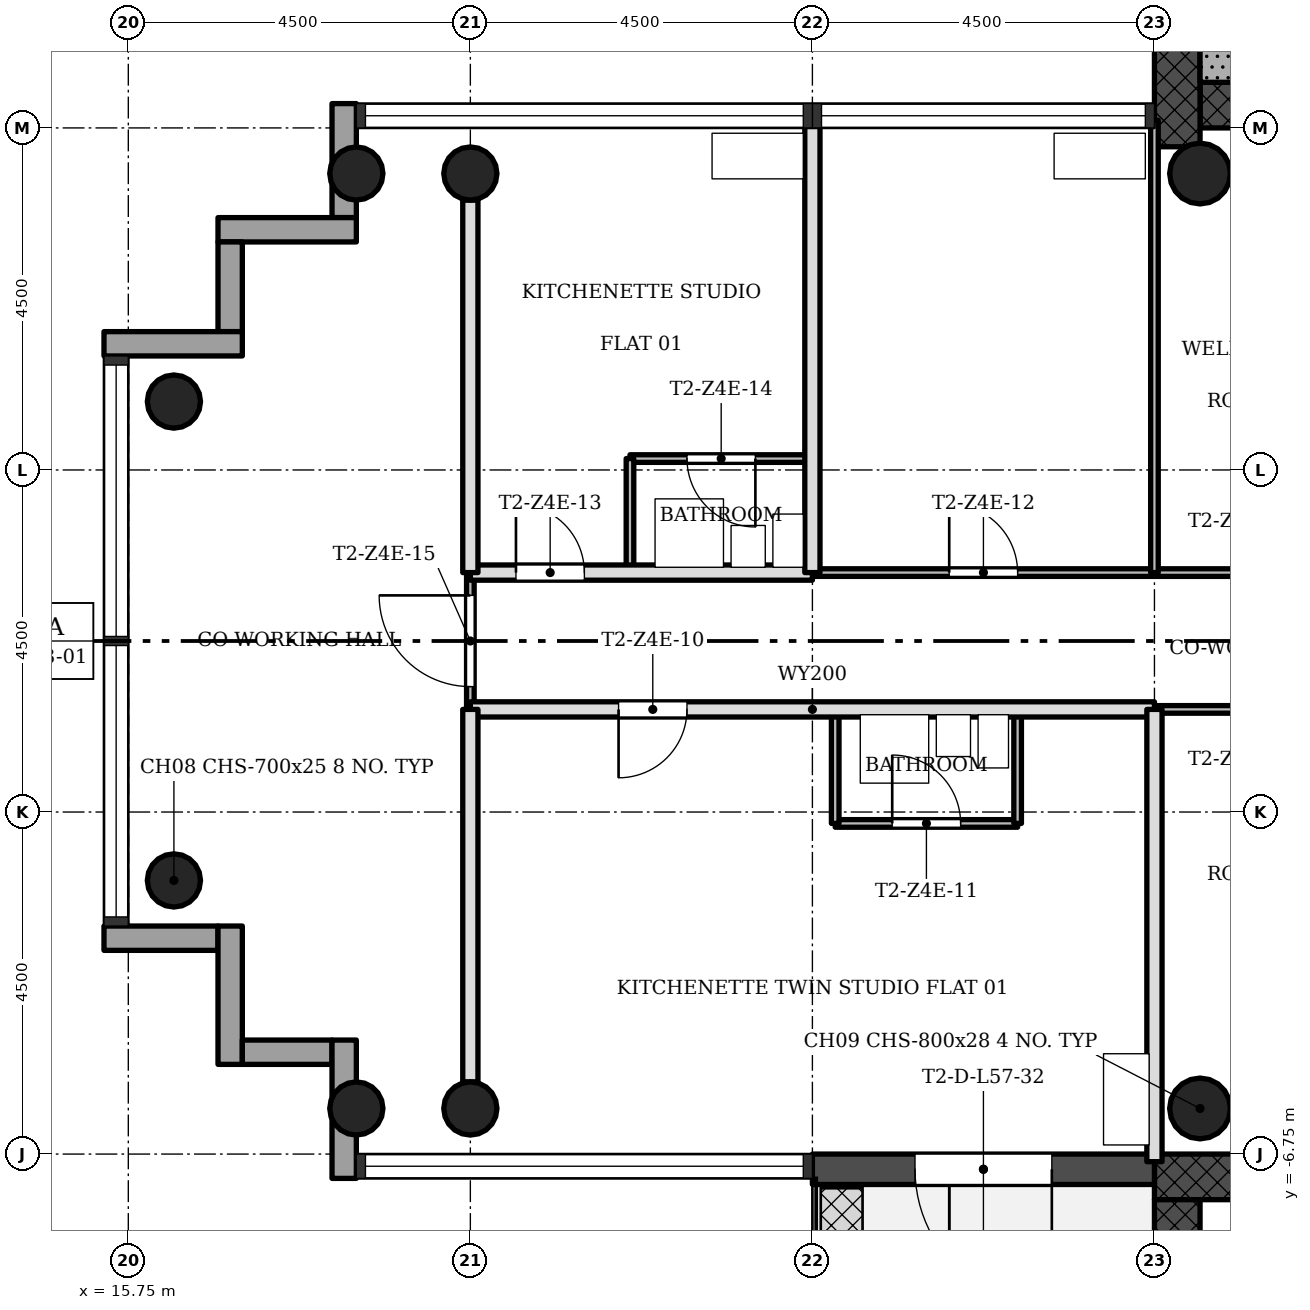
"""IFC4 building model, lengths in metres.
Left out: names, types, materials, properties, quantities, classifications, styles, units other than length and angle.
Written with IfcOpenShell. Run it as: python <this file> out.ifc"""

import sys

from ifc_helpers import new_model, si_unit, direction, frame, frame_2d, origin, origin_2d, place, context, subcontext, project, spatial, rectangle, hollow_circle, extrude, element, fill, save


model = new_model("IFC4")
c1 = context("Model", 3, precision=1e-05, world=origin(), true_north=direction((0.0, 1.0)))
c2 = subcontext(c1, "Body", "Model", "MODEL_VIEW")
j1 = project(units=[si_unit("LENGTHUNIT", "METRE"), si_unit("PLANEANGLEUNIT", "RADIAN")], contexts=[c1])
p1 = place(None, origin())
s1 = spatial("IfcSite", under=j1, at=p1, CompositionType="ELEMENT")
p2 = place(p1, origin())
s2 = spatial("IfcBuilding", under=s1, at=p2, CompositionType="ELEMENT")
p3 = place(p2, frame((0.0, 0.0, 206.2)))
s3 = spatial("IfcBuildingStorey", under=s2, at=p3, CompositionType="ELEMENT", Elevation=206.2)
p4 = place(p3, frame((29.85, 7.05, 0.0), z_axis=(0.0, 0.0, 1.0), x_axis=(1.0, 0.0, 0.0)))
e1 = element("IfcWall", 1, at=p4, inside=s3, PredefinedType="SHEAR", context=c2, shape_type="SweptSolid", body=[
    extrude(rectangle(XDim=12.9, YDim=0.6, at=frame_2d((6.45, 0.0))), origin(), (0.0, 0.0, 1.0), 3.4),
])
p5 = place(p4, frame((5.25, 0.0, 0.0)))
e2 = element("IfcOpeningElement", 2, at=p5, cuts=e1, PredefinedType="OPENING", context=c2, shape_type="SweptSolid", body=[
    extrude(rectangle(XDim=1.8, YDim=2.1, at=frame_2d((0.9, 1.05))), frame((0.0, 0.31, 0.0), z_axis=(0.0, -1.0, 0.0), x_axis=(1.0, 0.0, 0.0)), (0.0, 0.0, 1.0), 0.62),
])
p6 = place(p3, frame((29.55, 15.15, 0.0), z_axis=(0.0, 0.0, 1.0), x_axis=(0.0, -1.0, 0.0)))
e3 = element("IfcWall", 3, at=p6, inside=s3, PredefinedType="SHEAR", context=c2, shape_type="SweptSolid", body=[
    extrude(rectangle(XDim=8.648, YDim=0.6, at=frame_2d((4.324, 0.0))), origin(), (0.0, 0.0, 1.0), 3.4),
])
p7 = place(p3, frame((42.15, -7.05, 0.0), z_axis=(0.0, 0.0, 1.0), x_axis=(-1.0, 0.0, 0.0)))
e4 = element("IfcWall", 4, at=p7, inside=s3, PredefinedType="SHEAR", context=c2, shape_type="SweptSolid", body=[
    extrude(rectangle(XDim=12.9, YDim=0.6, at=frame_2d((6.45, 0.0))), origin(), (0.0, 0.0, 1.0), 3.4),
])
p8 = place(p7, frame((5.25, 0.0, 0.0)))
e5 = element("IfcOpeningElement", 5, at=p8, cuts=e4, PredefinedType="OPENING", context=c2, shape_type="SweptSolid", body=[
    extrude(rectangle(XDim=1.8, YDim=2.1, at=frame_2d((0.9, 1.05))), frame((0.0, 0.31, 0.0), z_axis=(0.0, -1.0, 0.0), x_axis=(1.0, 0.0, 0.0)), (0.0, 0.0, 1.0), 0.62),
])
p9 = place(p3, frame((29.55, -7.35, 0.0), z_axis=(0.0, 0.0, 1.0), x_axis=(0.0, -1.0, 0.0)))
e6 = element("IfcWall", 6, at=p9, inside=s3, PredefinedType="SHEAR", context=c2, shape_type="SweptSolid", body=[
    extrude(rectangle(XDim=8.4, YDim=0.6, at=frame_2d((4.2, 0.0))), origin(), (0.0, 0.0, 1.0), 3.4),
])
for number, where, z_axis, x_axis in (
    (7, (20.25, 6.15, 0.0), (0.0, 0.0, 1.0), (1.0, 0.0, 0.0)),
    (8, (20.25, -6.15, 0.0), (0.0, 0.0, 1.0), (1.0, 0.0, 0.0)),
    (9, (18.75, 6.15, 0.0), (0.0, 0.0, 1.0), (1.0, 0.0, 0.0)),
    (10, (18.75, -6.15, 0.0), (0.0, 0.0, 1.0), (1.0, 0.0, 0.0)),
    (11, (16.35, 3.15, 0.0), (0.0, 0.0, 1.0), (1.0, 0.0, 0.0)),
    (12, (16.35, -3.15, 0.0), (0.0, 0.0, 1.0), (1.0, 0.0, 0.0)),
):
    element("IfcColumn", number, at=place(p3, frame(where, z_axis=z_axis, x_axis=x_axis)), inside=s3, PredefinedType="COLUMN", context=c2, shape_type="SweptSolid", body=[
        extrude(hollow_circle(Radius=0.35, WallThickness=0.025, at=origin_2d()), origin(), (0.0, 0.0, 1.0), 3.4),
    ])
for number, where, z_axis, x_axis in (
    (13, (29.85, 6.15, 0.0), (0.0, 0.0, 1.0), (1.0, 0.0, 0.0)),
    (14, (29.85, -6.15, 0.0), (0.0, 0.0, 1.0), (1.0, 0.0, 0.0)),
):
    element("IfcColumn", number, at=place(p3, frame(where, z_axis=z_axis, x_axis=x_axis)), inside=s3, PredefinedType="COLUMN", context=c2, shape_type="SweptSolid", body=[
        extrude(hollow_circle(Radius=0.4, WallThickness=0.028, at=origin_2d()), origin(), (0.0, 0.0, 1.0), 3.4),
    ])
p10 = place(p3, frame((18.59, 7.07, -0.3), z_axis=(0.0, 0.0, 1.0), x_axis=(0.0, -1.0, 0.0)))
e15 = element("IfcWall", 15, at=p10, inside=s3, PredefinedType="STANDARD", context=c2, shape_type="SweptSolid", body=[
    extrude(rectangle(XDim=1.5, YDim=0.32, at=frame_2d((0.75, 0.0))), origin(), (0.0, 0.0, 1.0), 3.4),
])
p11 = place(p3, frame((18.75, 5.41, -0.3), z_axis=(0.0, 0.0, 1.0), x_axis=(-1.0, 0.0, 0.0)))
e16 = element("IfcWall", 16, at=p11, inside=s3, PredefinedType="STANDARD", context=c2, shape_type="SweptSolid", body=[
    extrude(rectangle(XDim=1.82, YDim=0.32, at=frame_2d((0.91, 0.0))), origin(), (0.0, 0.0, 1.0), 3.4),
])
p12 = place(p3, frame((17.09, 5.25, -0.3), z_axis=(0.0, 0.0, 1.0), x_axis=(0.0, -1.0, 0.0)))
e17 = element("IfcWall", 17, at=p12, inside=s3, PredefinedType="STANDARD", context=c2, shape_type="SweptSolid", body=[
    extrude(rectangle(XDim=1.18, YDim=0.32, at=frame_2d((0.59, 0.0))), origin(), (0.0, 0.0, 1.0), 3.4),
])
p13 = place(p3, frame((17.25, 3.91, -0.3), z_axis=(0.0, 0.0, 1.0), x_axis=(-1.0, 0.0, 0.0)))
e18 = element("IfcWall", 18, at=p13, inside=s3, PredefinedType="STANDARD", context=c2, shape_type="SweptSolid", body=[
    extrude(rectangle(XDim=1.82, YDim=0.32, at=frame_2d((0.91, 0.0))), origin(), (0.0, 0.0, 1.0), 3.4),
])
p14 = place(p3, frame((15.43, -3.91, -0.3), z_axis=(0.0, 0.0, 1.0), x_axis=(1.0, 0.0, 0.0)))
e19 = element("IfcWall", 19, at=p14, inside=s3, PredefinedType="STANDARD", context=c2, shape_type="SweptSolid", body=[
    extrude(rectangle(XDim=1.5, YDim=0.32, at=frame_2d((0.75, 0.0))), origin(), (0.0, 0.0, 1.0), 3.4),
])
p15 = place(p3, frame((17.09, -3.75, -0.3), z_axis=(0.0, 0.0, 1.0), x_axis=(0.0, -1.0, 0.0)))
e20 = element("IfcWall", 20, at=p15, inside=s3, PredefinedType="STANDARD", context=c2, shape_type="SweptSolid", body=[
    extrude(rectangle(XDim=1.82, YDim=0.32, at=frame_2d((0.91, 0.0))), origin(), (0.0, 0.0, 1.0), 3.4),
])
p16 = place(p3, frame((17.25, -5.41, -0.3), z_axis=(0.0, 0.0, 1.0), x_axis=(1.0, 0.0, 0.0)))
e21 = element("IfcWall", 21, at=p16, inside=s3, PredefinedType="STANDARD", context=c2, shape_type="SweptSolid", body=[
    extrude(rectangle(XDim=1.18, YDim=0.32, at=frame_2d((0.59, 0.0))), origin(), (0.0, 0.0, 1.0), 3.4),
])
p17 = place(p3, frame((18.59, -5.25, -0.3), z_axis=(0.0, 0.0, 1.0), x_axis=(0.0, -1.0, 0.0)))
e22 = element("IfcWall", 22, at=p17, inside=s3, PredefinedType="STANDARD", context=c2, shape_type="SweptSolid", body=[
    extrude(rectangle(XDim=1.82, YDim=0.32, at=frame_2d((0.91, 0.0))), origin(), (0.0, 0.0, 1.0), 3.4),
])
p18 = place(p3, frame((24.75, -6.95, -0.02), z_axis=(0.0, 0.0, 1.0), x_axis=(1.0, 0.0, 0.0)))
e23 = element("IfcWall", 23, at=p18, inside=s3, PredefinedType="STANDARD", context=c2, shape_type="SweptSolid", body=[
    extrude(rectangle(XDim=4.5, YDim=0.4, at=frame_2d((2.25, 0.0))), origin(), (0.0, 0.0, 1.0), 3.12),
])
p19 = place(p18, frame((1.35, 0.0, 0.02)))
e24 = element("IfcOpeningElement", 24, at=p19, cuts=e23, PredefinedType="OPENING", context=c2, shape_type="SweptSolid", body=[
    extrude(rectangle(XDim=1.8, YDim=2.1, at=frame_2d((0.9, 1.05))), frame((0.0, 0.21, 0.0), z_axis=(0.0, -1.0, 0.0), x_axis=(1.0, 0.0, 0.0)), (0.0, 0.0, 1.0), 0.42),
])
p20 = place(p3, frame((27.45, -2.4, 0.0), z_axis=(0.0, 0.0, 1.0), x_axis=(-1.0, 0.0, 0.0)))
e25 = element("IfcWall", 25, at=p20, inside=s3, PredefinedType="PARTITIONING", context=c2, shape_type="SweptSolid", body=[
    extrude(rectangle(XDim=2.4, YDim=0.1, at=frame_2d((1.2, 0.0))), origin(), (0.0, 0.0, 1.0), 3.0),
])
p21 = place(p20, frame((0.75, 0.0, 0.0)))
e26 = element("IfcOpeningElement", 26, at=p21, cuts=e25, PredefinedType="OPENING", context=c2, shape_type="SweptSolid", body=[
    extrude(rectangle(XDim=0.9, YDim=2.1, at=frame_2d((0.45, 1.05))), frame((0.0, 0.06, 0.0), z_axis=(0.0, -1.0, 0.0), x_axis=(1.0, 0.0, 0.0)), (0.0, 0.0, 1.0), 0.12),
])
p22 = place(p3, frame((31.5, -0.9, 0.0), z_axis=(0.0, 0.0, 1.0), x_axis=(-1.0, 0.0, 0.0)))
e27 = element("IfcWall", 27, at=p22, inside=s3, PredefinedType="PARTITIONING", context=c2, shape_type="SweptSolid", body=[
    extrude(rectangle(XDim=2.25, YDim=0.1, at=frame_2d((1.125, 0.0))), origin(), (0.0, 0.0, 1.0), 3.0),
])
p23 = place(p3, frame((29.25, -0.9, 0.0), z_axis=(0.0, 0.0, 1.0), x_axis=(-1.0, 0.0, 0.0)))
e28 = element("IfcWall", 28, at=p23, inside=s3, PredefinedType="SOLIDWALL", context=c2, shape_type="SweptSolid", body=[
    extrude(rectangle(XDim=9.0, YDim=0.2, at=frame_2d((4.5, 0.0))), origin(), (0.0, 0.0, 1.0), 3.0),
])
p24 = place(p23, frame((6.15, 0.0, 0.0)))
e29 = element("IfcOpeningElement", 29, at=p24, cuts=e28, PredefinedType="OPENING", context=c2, shape_type="SweptSolid", body=[
    extrude(rectangle(XDim=0.9, YDim=2.1, at=frame_2d((0.45, 1.05))), frame((0.0, 0.11, 0.0), z_axis=(0.0, -1.0, 0.0), x_axis=(1.0, 0.0, 0.0)), (0.0, 0.0, 1.0), 0.22),
])
p25 = place(p3, frame((31.5, 0.9, 0.0), z_axis=(0.0, 0.0, 1.0), x_axis=(-1.0, 0.0, 0.0)))
e30 = element("IfcWall", 30, at=p25, inside=s3, PredefinedType="PARTITIONING", context=c2, shape_type="SweptSolid", body=[
    extrude(rectangle(XDim=6.75, YDim=0.1, at=frame_2d((3.375, 0.0))), origin(), (0.0, 0.0, 1.0), 3.0),
])
p26 = place(p25, frame((4.05, 0.0, 0.0)))
e31 = element("IfcOpeningElement", 31, at=p26, cuts=e30, PredefinedType="OPENING", context=c2, shape_type="SweptSolid", body=[
    extrude(rectangle(XDim=0.9, YDim=2.1, at=frame_2d((0.45, 1.05))), frame((0.0, 0.06, 0.0), z_axis=(0.0, -1.0, 0.0), x_axis=(1.0, 0.0, 0.0)), (0.0, 0.0, 1.0), 0.12),
])
p27 = place(p3, frame((24.75, 0.9, 0.0), z_axis=(0.0, 0.0, 1.0), x_axis=(-1.0, 0.0, 0.0)))
e32 = element("IfcWall", 32, at=p27, inside=s3, PredefinedType="SOLIDWALL", context=c2, shape_type="SweptSolid", body=[
    extrude(rectangle(XDim=4.5, YDim=0.2, at=frame_2d((2.25, 0.0))), origin(), (0.0, 0.0, 1.0), 3.0),
])
p28 = place(p27, frame((3.0, 0.0, 0.0)))
e33 = element("IfcOpeningElement", 33, at=p28, cuts=e32, PredefinedType="OPENING", context=c2, shape_type="SweptSolid", body=[
    extrude(rectangle(XDim=0.9, YDim=2.1, at=frame_2d((0.45, 1.05))), frame((0.0, 0.11, 0.0), z_axis=(0.0, -1.0, 0.0), x_axis=(1.0, 0.0, 0.0)), (0.0, 0.0, 1.0), 0.22),
])
p29 = place(p3, frame((24.75, 2.4, 0.0), z_axis=(0.0, 0.0, 1.0), x_axis=(-1.0, 0.0, 0.0)))
e34 = element("IfcWall", 34, at=p29, inside=s3, PredefinedType="PARTITIONING", context=c2, shape_type="SweptSolid", body=[
    extrude(rectangle(XDim=2.4, YDim=0.1, at=frame_2d((1.2, 0.0))), origin(), (0.0, 0.0, 1.0), 3.0),
])
p30 = place(p29, frame((0.75, 0.0, 0.0)))
e35 = element("IfcOpeningElement", 35, at=p30, cuts=e34, PredefinedType="OPENING", context=c2, shape_type="SweptSolid", body=[
    extrude(rectangle(XDim=0.9, YDim=2.1, at=frame_2d((0.45, 1.05))), frame((0.0, 0.06, 0.0), z_axis=(0.0, -1.0, 0.0), x_axis=(1.0, 0.0, 0.0)), (0.0, 0.0, 1.0), 0.12),
])
p31 = place(p3, frame((29.25, 0.9, 0.0), z_axis=(0.0, 0.0, 1.0), x_axis=(0.0, 1.0, 0.0)))
e36 = element("IfcWall", 36, at=p31, inside=s3, PredefinedType="PARTITIONING", context=c2, shape_type="SweptSolid", body=[
    extrude(rectangle(XDim=5.95, YDim=0.1, at=frame_2d((2.975, 0.0))), origin(), (0.0, 0.0, 1.0), 3.0),
])
p32 = place(p3, frame((29.25, -6.85, 0.0), z_axis=(0.0, 0.0, 1.0), x_axis=(0.0, 1.0, 0.0)))
e37 = element("IfcWall", 37, at=p32, inside=s3, PredefinedType="SOLIDWALL", context=c2, shape_type="SweptSolid", body=[
    extrude(rectangle(XDim=5.95, YDim=0.2, at=frame_2d((2.975, 0.0))), origin(), (0.0, 0.0, 1.0), 3.0),
])
for number, where, z_axis, x_axis in (
    (38, (27.45, -2.4, 0.0), (0.0, 0.0, 1.0), (0.0, 1.0, 0.0)),
    (39, (25.05, -2.4, 0.0), (0.0, 0.0, 1.0), (0.0, 1.0, 0.0)),
):
    element("IfcWall", number, at=place(p3, frame(where, z_axis=z_axis, x_axis=x_axis)), inside=s3, PredefinedType="PARTITIONING", context=c2, shape_type="SweptSolid", body=[
        extrude(rectangle(XDim=1.5, YDim=0.1, at=frame_2d((0.75, 0.0))), origin(), (0.0, 0.0, 1.0), 3.0),
    ])
p33 = place(p3, frame((24.75, 0.9, 0.0), z_axis=(0.0, 0.0, 1.0), x_axis=(0.0, 1.0, 0.0)))
e40 = element("IfcWall", 40, at=p33, inside=s3, PredefinedType="SOLIDWALL", context=c2, shape_type="SweptSolid", body=[
    extrude(rectangle(XDim=5.95, YDim=0.2, at=frame_2d((2.975, 0.0))), origin(), (0.0, 0.0, 1.0), 3.0),
])
p34 = place(p3, frame((22.35, 0.9, 0.0), z_axis=(0.0, 0.0, 1.0), x_axis=(0.0, 1.0, 0.0)))
e41 = element("IfcWall", 41, at=p34, inside=s3, PredefinedType="PARTITIONING", context=c2, shape_type="SweptSolid", body=[
    extrude(rectangle(XDim=1.5, YDim=0.1, at=frame_2d((0.75, 0.0))), origin(), (0.0, 0.0, 1.0), 3.0),
])
p35 = place(p3, frame((20.25, -0.9, 0.0), z_axis=(0.0, 0.0, 1.0), x_axis=(0.0, 1.0, 0.0)))
e42 = element("IfcWall", 42, at=p35, inside=s3, PredefinedType="PARTITIONING", context=c2, shape_type="SweptSolid", body=[
    extrude(rectangle(XDim=1.8, YDim=0.1, at=frame_2d((0.9, 0.0))), origin(), (0.0, 0.0, 1.0), 3.0),
])
p36 = place(p35, frame((0.3, 0.0, 0.0)))
e43 = element("IfcOpeningElement", 43, at=p36, cuts=e42, PredefinedType="OPENING", context=c2, shape_type="SweptSolid", body=[
    extrude(rectangle(XDim=1.2, YDim=2.1, at=frame_2d((0.6, 1.05))), frame((0.0, 0.06, 0.0), z_axis=(0.0, -1.0, 0.0), x_axis=(1.0, 0.0, 0.0)), (0.0, 0.0, 1.0), 0.12),
])
for number, where, z_axis, x_axis in (
    (44, (20.25, -5.8, 0.0), (0.0, 0.0, 1.0), (0.0, 1.0, 0.0)),
    (45, (20.25, 0.9, 0.0), (0.0, 0.0, 1.0), (0.0, 1.0, 0.0)),
):
    element("IfcWall", number, at=place(p3, frame(where, z_axis=z_axis, x_axis=x_axis)), inside=s3, PredefinedType="SOLIDWALL", context=c2, shape_type="SweptSolid", body=[
        extrude(rectangle(XDim=4.9, YDim=0.2, at=frame_2d((2.45, 0.0))), origin(), (0.0, 0.0, 1.0), 3.0),
    ])
p37 = place(p3, frame((34.15, 7.65, 0.0), z_axis=(0.0, 0.0, 1.0), x_axis=(-1.0, 0.0, 0.0)))
e46 = element("IfcWall", 46, at=p37, inside=s3, PredefinedType="SHEAR", context=c2, shape_type="SweptSolid", body=[
    extrude(rectangle(XDim=4.3, YDim=0.6, at=frame_2d((2.15, 0.0))), origin(), (0.0, 0.0, 1.0), 3.4),
])
p38 = place(p19, origin())
e47 = element("IfcDoor", 47, at=p38, inside=s3, OperationType="SINGLE_SWING_RIGHT", PredefinedType="DOOR", context=c2, shape_type="SweptSolid", body=[
    extrude(rectangle(XDim=1.8, YDim=2.1, at=frame_2d((0.9, 1.05))), frame((0.0, 0.025, 0.0), z_axis=(0.0, -1.0, 0.0), x_axis=(1.0, 0.0, 0.0)), (0.0, 0.0, 1.0), 0.05),
])
fill(e24, e47)
p39 = place(p24, origin())
e48 = element("IfcDoor", 48, at=p39, inside=s3, OperationType="SINGLE_SWING_LEFT", PredefinedType="DOOR", context=c2, shape_type="SweptSolid", body=[
    extrude(rectangle(XDim=0.9, YDim=2.1, at=frame_2d((0.45, 1.05))), frame((0.0, 0.025, 0.0), z_axis=(0.0, -1.0, 0.0), x_axis=(1.0, 0.0, 0.0)), (0.0, 0.0, 1.0), 0.05),
])
fill(e29, e48)
p40 = place(p21, origin())
e49 = element("IfcDoor", 49, at=p40, inside=s3, OperationType="SINGLE_SWING_RIGHT", PredefinedType="DOOR", context=c2, shape_type="SweptSolid", body=[
    extrude(rectangle(XDim=0.9, YDim=2.1, at=frame_2d((0.45, 1.05))), frame((0.0, 0.025, 0.0), z_axis=(0.0, -1.0, 0.0), x_axis=(1.0, 0.0, 0.0)), (0.0, 0.0, 1.0), 0.05),
])
fill(e26, e49)
p41 = place(p26, origin())
e50 = element("IfcDoor", 50, at=p41, inside=s3, OperationType="SINGLE_SWING_RIGHT", PredefinedType="DOOR", context=c2, shape_type="SweptSolid", body=[
    extrude(rectangle(XDim=0.9, YDim=2.1, at=frame_2d((0.45, 1.05))), frame((0.0, 0.025, 0.0), z_axis=(0.0, -1.0, 0.0), x_axis=(1.0, 0.0, 0.0)), (0.0, 0.0, 1.0), 0.05),
])
fill(e31, e50)
p42 = place(p28, origin())
e51 = element("IfcDoor", 51, at=p42, inside=s3, OperationType="SINGLE_SWING_RIGHT", PredefinedType="DOOR", context=c2, shape_type="SweptSolid", body=[
    extrude(rectangle(XDim=0.9, YDim=2.1, at=frame_2d((0.45, 1.05))), frame((0.0, 0.025, 0.0), z_axis=(0.0, -1.0, 0.0), x_axis=(1.0, 0.0, 0.0)), (0.0, 0.0, 1.0), 0.05),
])
fill(e33, e51)
p43 = place(p30, origin())
e52 = element("IfcDoor", 52, at=p43, inside=s3, OperationType="SINGLE_SWING_RIGHT", PredefinedType="DOOR", context=c2, shape_type="SweptSolid", body=[
    extrude(rectangle(XDim=0.9, YDim=2.1, at=frame_2d((0.45, 1.05))), frame((0.0, 0.025, 0.0), z_axis=(0.0, -1.0, 0.0), x_axis=(1.0, 0.0, 0.0)), (0.0, 0.0, 1.0), 0.05),
])
fill(e35, e52)
p44 = place(p36, origin())
e53 = element("IfcDoor", 53, at=p44, inside=s3, OperationType="SINGLE_SWING_LEFT", PredefinedType="DOOR", context=c2, shape_type="SweptSolid", body=[
    extrude(rectangle(XDim=1.2, YDim=2.1, at=frame_2d((0.6, 1.05))), frame((0.0, 0.025, 0.0), z_axis=(0.0, -1.0, 0.0), x_axis=(1.0, 0.0, 0.0)), (0.0, 0.0, 1.0), 0.05),
])
fill(e43, e53)
save(model, sys.argv[1])
